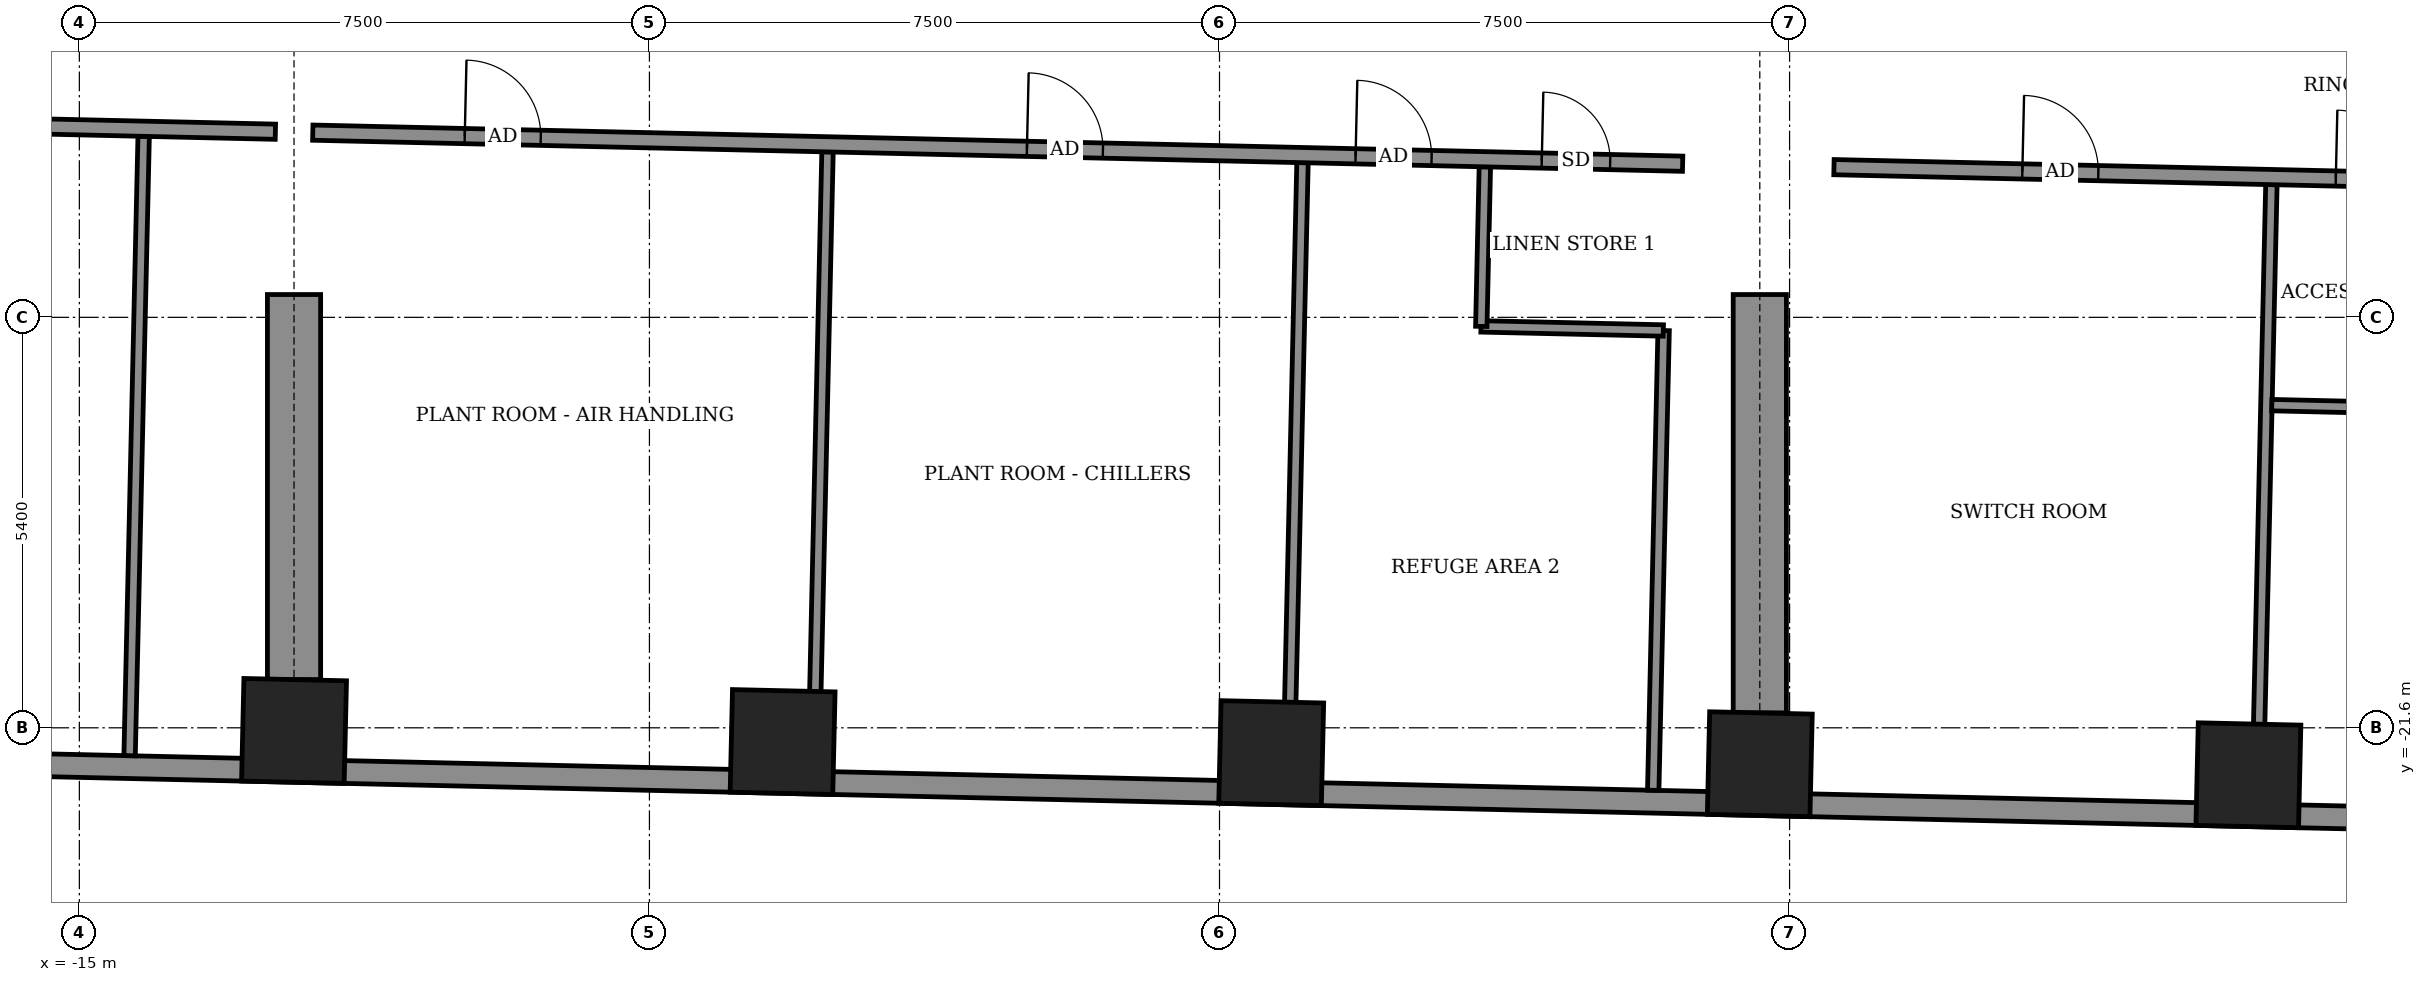
"""IFC4 building model, lengths in metres.
Left out: names, types, materials, properties, quantities, classifications, styles, units other than length and angle.
Written with IfcOpenShell. Run it as: python <this file> out.ifc"""

import sys

from ifc_helpers import new_model, si_unit, direction, frame, frame_2d, origin, origin_2d, place, context, subcontext, project, spatial, rectangle, extrude, element, fill, save


model = new_model("IFC4")
c1 = context("Model", 3, precision=1e-05, world=origin(), true_north=direction((0.0, 1.0)))
c2 = subcontext(c1, "Body", "Model", "MODEL_VIEW")
j1 = project(units=[si_unit("LENGTHUNIT", "METRE"), si_unit("PLANEANGLEUNIT", "RADIAN")], contexts=[c1])
p1 = place(None, origin())
s1 = spatial("IfcSite", under=j1, at=p1, CompositionType="ELEMENT")
p2 = place(p1, origin())
s2 = spatial("IfcBuilding", under=s1, at=p2, CompositionType="ELEMENT")
p3 = place(p2, frame((0.0, 0.0, 119.9)))
s3 = spatial("IfcBuildingStorey", under=s2, at=p3, CompositionType="ELEMENT", Elevation=119.9)
for number, where, z_axis, x_axis in (
    (1, (-12.176, -21.641, -0.55), (0.0, 0.0, 1.0), (1.0, -0.023, 0.0)),
    (2, (-5.748, -21.787, -0.55), (0.0, 0.0, 1.0), (1.0, -0.023, 0.0)),
    (3, (0.68, -21.933, -0.55), (0.0, 0.0, 1.0), (1.0, -0.023, 0.0)),
    (4, (7.108, -22.079, -0.55), (0.0, 0.0, 1.0), (1.0, -0.023, 0.0)),
    (5, (13.536, -22.224, -0.55), (0.0, 0.0, 1.0), (1.0, -0.023, 0.0)),
):
    element("IfcColumn", number, at=place(p3, frame(where, z_axis=z_axis, x_axis=x_axis)), inside=s3, PredefinedType="COLUMN", context=c2, shape_type="SweptSolid", body=[
        extrude(rectangle(XDim=1.35, YDim=1.35, at=origin_2d()), origin(), (0.0, 0.0, 1.0), 5.6),
    ])
p4 = place(p3, frame((7.108, -15.9, 0.0), z_axis=(0.0, 0.0, 1.0), x_axis=(0.0, -1.0, 0.0)))
e6 = element("IfcWall", 6, at=p4, inside=s3, PredefinedType="SHEAR", context=c2, shape_type="SweptSolid", body=[
    extrude(rectangle(XDim=5.504, YDim=0.7, at=frame_2d((2.752, 0.0))), origin(), (0.0, 0.0, 1.0), 3.0),
])
p5 = place(p3, frame((-12.176, -15.9, 0.0), z_axis=(0.0, 0.0, 1.0), x_axis=(0.0, -1.0, 0.0)))
e7 = element("IfcWall", 7, at=p5, inside=s3, PredefinedType="SHEAR", context=c2, shape_type="SweptSolid", body=[
    extrude(rectangle(XDim=5.066, YDim=0.7, at=frame_2d((2.533, 0.0))), origin(), (0.0, 0.0, 1.0), 3.0),
])
p6 = place(p3, frame((-24.894, -21.878, 0.0), z_axis=(0.0, 0.0, 1.0), x_axis=(0.999742689045, -0.022683820265, 0.0)))
e8 = element("IfcWall", 8, at=p6, inside=s3, PredefinedType="SOLIDWALL", context=c2, shape_type="SweptSolid", body=[
    extrude(rectangle(XDim=44.708, YDim=0.3, at=frame_2d((22.354, 0.0))), origin(), (0.0, 0.0, 1.0), 5.05),
])
p7 = place(p3, frame((-14.339, -21.967, 0.0), z_axis=(0.0, 0.0, 1.0), x_axis=(0.022706435224, 0.999742175663, 0.0)))
e9 = element("IfcWall", 9, at=p7, inside=s3, PredefinedType="PARTITIONING", context=c2, shape_type="SweptSolid", body=[
    extrude(rectangle(XDim=8.15, YDim=0.15, at=frame_2d((4.075, 0.0))), origin(), (0.0, 0.0, 1.0), 4.45),
])
p8 = place(p3, frame((-5.341, -22.172, 0.0), z_axis=(0.0, 0.0, 1.0), x_axis=(0.022583291997, 0.99974496494, 0.0)))
e10 = element("IfcWall", 10, at=p8, inside=s3, PredefinedType="PARTITIONING", context=c2, shape_type="SweptSolid", body=[
    extrude(rectangle(XDim=8.151, YDim=0.15, at=frame_2d((4.076, 0.0))), origin(), (0.0, 0.0, 1.0), 5.05),
])
p9 = place(p3, frame((0.907, -22.313, 0.0), z_axis=(0.0, 0.0, 1.0), x_axis=(0.022706435224, 0.999742175663, 0.0)))
e11 = element("IfcWall", 11, at=p9, inside=s3, PredefinedType="PARTITIONING", context=c2, shape_type="SweptSolid", body=[
    extrude(rectangle(XDim=8.15, YDim=0.15, at=frame_2d((4.075, 0.0))), origin(), (0.0, 0.0, 1.0), 5.05),
])
p10 = place(p3, frame((5.706, -22.422, 0.0), z_axis=(0.0, 0.0, 1.0), x_axis=(0.022639817871, 0.999743686475, 0.0)))
e12 = element("IfcWall", 12, at=p10, inside=s3, PredefinedType="PARTITIONING", context=c2, shape_type="SweptSolid", body=[
    extrude(rectangle(XDim=6.05, YDim=0.15, at=frame_2d((3.025, 0.0))), origin(), (0.0, 0.0, 1.0), 4.45),
])
p11 = place(p3, frame((13.654, -22.602, 0.0), z_axis=(0.0, 0.0, 1.0), x_axis=(0.022706435224, 0.999742175663, 0.0)))
e13 = element("IfcWall", 13, at=p11, inside=s3, PredefinedType="PARTITIONING", context=c2, shape_type="SweptSolid", body=[
    extrude(rectangle(XDim=8.15, YDim=0.15, at=frame_2d((4.075, 0.0))), origin(), (0.0, 0.0, 1.0), 5.05),
])
p12 = place(p3, frame((13.844, -17.355, 0.0), z_axis=(0.0, 0.0, 1.0), x_axis=(0.999735102249, -0.023015762656, 0.0)))
e14 = element("IfcWall", 14, at=p12, inside=s3, PredefinedType="PARTITIONING", context=c2, shape_type="SweptSolid", body=[
    extrude(rectangle(XDim=2.525, YDim=0.15, at=frame_2d((1.262, 0.0))), origin(), (0.0, 0.0, 1.0), 5.05),
])
p13 = place(p3, frame((3.44, -16.319, 0.0), z_axis=(0.0, 0.0, 1.0), x_axis=(0.999747216954, -0.022483375898, 0.0)))
e15 = element("IfcWall", 15, at=p13, inside=s3, PredefinedType="PARTITIONING", context=c2, shape_type="SweptSolid", body=[
    extrude(rectangle(XDim=2.4, YDim=0.15, at=frame_2d((1.2, 0.0))), origin(), (0.0, 0.0, 1.0), 5.05),
])
p14 = place(p3, frame((3.444, -16.319, 0.0), z_axis=(0.0, 0.0, 1.0), x_axis=(0.022325208909, 0.999750761464, 0.0)))
e16 = element("IfcWall", 16, at=p14, inside=s3, PredefinedType="PARTITIONING", context=c2, shape_type="SweptSolid", body=[
    extrude(rectangle(XDim=2.1, YDim=0.15, at=frame_2d((1.05, 0.0))), origin(), (0.0, 0.0, 1.0), 5.05),
])
p15 = place(p3, frame((-26.978, -13.428, 0.0), z_axis=(0.0, 0.0, 1.0), x_axis=(0.999743028707, -0.022668845383, 0.0)))
e17 = element("IfcWall", 17, at=p15, inside=s3, PredefinedType="PARTITIONING", context=c2, shape_type="SweptSolid", body=[
    extrude(rectangle(XDim=14.561, YDim=0.2, at=frame_2d((7.28, 0.0))), origin(), (0.0, 0.0, 1.0), 3.0),
])
p16 = place(p15, frame((2.238, 0.0, 0.0)))
e18 = element("IfcOpeningElement", 18, at=p16, cuts=e17, PredefinedType="OPENING", context=c2, shape_type="SweptSolid", body=[
    extrude(rectangle(XDim=1.0, YDim=2.1, at=frame_2d((0.5, 1.05))), frame((0.0, 0.11, 0.0), z_axis=(0.0, -1.0, 0.0), x_axis=(1.0, 0.0, 0.0)), (0.0, 0.0, 1.0), 0.22),
])
p17 = place(p15, frame((9.2, 0.0, 0.0)))
e19 = element("IfcOpeningElement", 19, at=p17, cuts=e17, PredefinedType="OPENING", context=c2, shape_type="SweptSolid", body=[
    extrude(rectangle(XDim=1.0, YDim=2.1, at=frame_2d((0.5, 1.05))), frame((0.0, 0.11, 0.0), z_axis=(0.0, -1.0, 0.0), x_axis=(1.0, 0.0, 0.0)), (0.0, 0.0, 1.0), 0.22),
])
p18 = place(p3, frame((-11.929, -13.77, 0.0), z_axis=(0.0, 0.0, 1.0), x_axis=(0.999742659932, -0.0226851033, 0.0)))
e20 = element("IfcWall", 20, at=p18, inside=s3, PredefinedType="PARTITIONING", context=c2, shape_type="SweptSolid", body=[
    extrude(rectangle(XDim=18.027, YDim=0.2, at=frame_2d((9.013, 0.0))), origin(), (0.0, 0.0, 1.0), 3.0),
])
p19 = place(p18, frame((2.0, 0.0, 0.0)))
e21 = element("IfcOpeningElement", 21, at=p19, cuts=e20, PredefinedType="OPENING", context=c2, shape_type="SweptSolid", body=[
    extrude(rectangle(XDim=1.0, YDim=2.1, at=frame_2d((0.5, 1.05))), frame((0.0, 0.11, 0.0), z_axis=(0.0, -1.0, 0.0), x_axis=(1.0, 0.0, 0.0)), (0.0, 0.0, 1.0), 0.22),
])
p20 = place(p18, frame((9.398, 0.0, 0.0)))
e22 = element("IfcOpeningElement", 22, at=p20, cuts=e20, PredefinedType="OPENING", context=c2, shape_type="SweptSolid", body=[
    extrude(rectangle(XDim=1.0, YDim=2.1, at=frame_2d((0.5, 1.05))), frame((0.0, 0.11, 0.0), z_axis=(0.0, -1.0, 0.0), x_axis=(1.0, 0.0, 0.0)), (0.0, 0.0, 1.0), 0.22),
])
p21 = place(p18, frame((13.723, 0.0, 0.0)))
e23 = element("IfcOpeningElement", 23, at=p21, cuts=e20, PredefinedType="OPENING", context=c2, shape_type="SweptSolid", body=[
    extrude(rectangle(XDim=1.0, YDim=2.1, at=frame_2d((0.5, 1.05))), frame((0.0, 0.11, 0.0), z_axis=(0.0, -1.0, 0.0), x_axis=(1.0, 0.0, 0.0)), (0.0, 0.0, 1.0), 0.22),
])
p22 = place(p18, frame((16.173, 0.0, 0.0)))
e24 = element("IfcOpeningElement", 24, at=p22, cuts=e20, PredefinedType="OPENING", context=c2, shape_type="SweptSolid", body=[
    extrude(rectangle(XDim=0.9, YDim=2.1, at=frame_2d((0.45, 1.05))), frame((0.0, 0.11, 0.0), z_axis=(0.0, -1.0, 0.0), x_axis=(1.0, 0.0, 0.0)), (0.0, 0.0, 1.0), 0.22),
])
p23 = place(p3, frame((8.084, -14.224, 0.0), z_axis=(0.0, 0.0, 1.0), x_axis=(0.99974311352, -0.022665104655, 0.0)))
e25 = element("IfcWall", 25, at=p23, inside=s3, PredefinedType="PARTITIONING", context=c2, shape_type="SweptSolid", body=[
    extrude(rectangle(XDim=15.662, YDim=0.2, at=frame_2d((7.831, 0.0))), origin(), (0.0, 0.0, 1.0), 5.05),
])
p24 = place(p23, frame((2.479, 0.0, 0.0)))
e26 = element("IfcOpeningElement", 26, at=p24, cuts=e25, PredefinedType="OPENING", context=c2, shape_type="SweptSolid", body=[
    extrude(rectangle(XDim=1.0, YDim=2.1, at=frame_2d((0.5, 1.05))), frame((0.0, 0.11, 0.0), z_axis=(0.0, -1.0, 0.0), x_axis=(1.0, 0.0, 0.0)), (0.0, 0.0, 1.0), 0.22),
])
p25 = place(p23, frame((12.208, 0.0, 0.0)))
e27 = element("IfcOpeningElement", 27, at=p25, cuts=e25, PredefinedType="OPENING", context=c2, shape_type="SweptSolid", body=[
    extrude(rectangle(XDim=1.0, YDim=2.1, at=frame_2d((0.5, 1.05))), frame((0.0, 0.11, 0.0), z_axis=(0.0, -1.0, 0.0), x_axis=(1.0, 0.0, 0.0)), (0.0, 0.0, 1.0), 0.22),
])
p26 = place(p23, frame((6.604, 0.0, 0.0)))
e28 = element("IfcOpeningElement", 28, at=p26, cuts=e25, PredefinedType="OPENING", context=c2, shape_type="SweptSolid", body=[
    extrude(rectangle(XDim=0.9, YDim=2.1, at=frame_2d((0.45, 1.05))), frame((0.0, 0.11, 0.0), z_axis=(0.0, -1.0, 0.0), x_axis=(1.0, 0.0, 0.0)), (0.0, 0.0, 1.0), 0.22),
])
p27 = place(p19, origin())
e29 = element("IfcDoor", 29, at=p27, inside=s3, OperationType="SINGLE_SWING_LEFT", PredefinedType="DOOR", context=c2, shape_type="SweptSolid", body=[
    extrude(rectangle(XDim=1.0, YDim=2.1, at=frame_2d((0.5, 1.05))), frame((0.0, 0.025, 0.0), z_axis=(0.0, -1.0, 0.0), x_axis=(1.0, 0.0, 0.0)), (0.0, 0.0, 1.0), 0.05),
])
fill(e21, e29)
p28 = place(p20, origin())
e30 = element("IfcDoor", 30, at=p28, inside=s3, OperationType="SINGLE_SWING_RIGHT", PredefinedType="DOOR", context=c2, shape_type="SweptSolid", body=[
    extrude(rectangle(XDim=1.0, YDim=2.1, at=frame_2d((0.5, 1.05))), frame((0.0, 0.025, 0.0), z_axis=(0.0, -1.0, 0.0), x_axis=(1.0, 0.0, 0.0)), (0.0, 0.0, 1.0), 0.05),
])
fill(e22, e30)
p29 = place(p21, origin())
e31 = element("IfcDoor", 31, at=p29, inside=s3, OperationType="SINGLE_SWING_LEFT", PredefinedType="DOOR", context=c2, shape_type="SweptSolid", body=[
    extrude(rectangle(XDim=1.0, YDim=2.1, at=frame_2d((0.5, 1.05))), frame((0.0, 0.025, 0.0), z_axis=(0.0, -1.0, 0.0), x_axis=(1.0, 0.0, 0.0)), (0.0, 0.0, 1.0), 0.05),
])
fill(e23, e31)
p30 = place(p22, origin())
e32 = element("IfcDoor", 32, at=p30, inside=s3, OperationType="SINGLE_SWING_LEFT", PredefinedType="DOOR", context=c2, shape_type="SweptSolid", body=[
    extrude(rectangle(XDim=0.9, YDim=2.1, at=frame_2d((0.45, 1.05))), frame((0.0, 0.025, 0.0), z_axis=(0.0, -1.0, 0.0), x_axis=(1.0, 0.0, 0.0)), (0.0, 0.0, 1.0), 0.05),
])
fill(e24, e32)
p31 = place(p24, origin())
e33 = element("IfcDoor", 33, at=p31, inside=s3, OperationType="SINGLE_SWING_RIGHT", PredefinedType="DOOR", context=c2, shape_type="SweptSolid", body=[
    extrude(rectangle(XDim=1.0, YDim=2.1, at=frame_2d((0.5, 1.05))), frame((0.0, 0.025, 0.0), z_axis=(0.0, -1.0, 0.0), x_axis=(1.0, 0.0, 0.0)), (0.0, 0.0, 1.0), 0.05),
])
fill(e26, e33)
p32 = place(p26, origin())
e34 = element("IfcDoor", 34, at=p32, inside=s3, OperationType="SINGLE_SWING_RIGHT", PredefinedType="DOOR", context=c2, shape_type="SweptSolid", body=[
    extrude(rectangle(XDim=0.9, YDim=2.1, at=frame_2d((0.45, 1.05))), frame((0.0, 0.025, 0.0), z_axis=(0.0, -1.0, 0.0), x_axis=(1.0, 0.0, 0.0)), (0.0, 0.0, 1.0), 0.05),
])
fill(e28, e34)
save(model, sys.argv[1])
